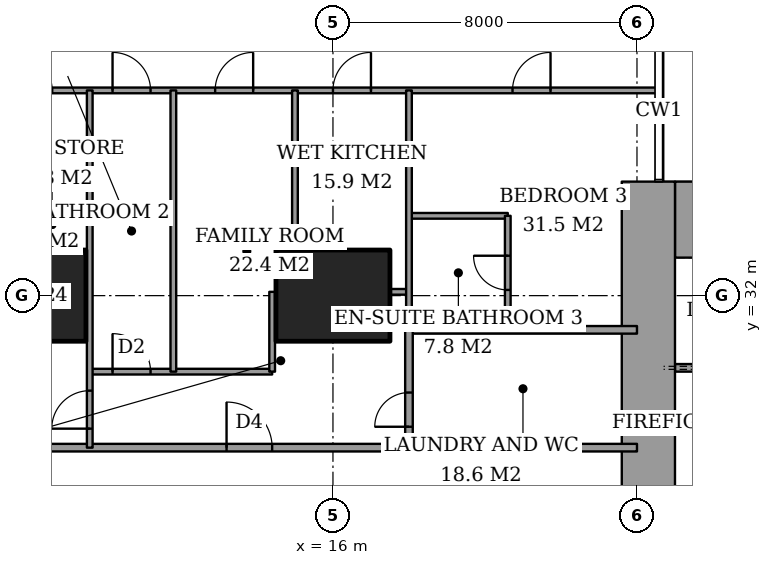
"""IFC4 building model, lengths in metres.
Left out: names, types, materials, properties, quantities, classifications, styles, units other than length and angle.
Written with IfcOpenShell. Run it as: python <this file> out.ifc"""

import sys

from ifc_helpers import new_model, si_unit, direction, frame, frame_2d, origin, origin_2d, place, context, subcontext, project, spatial, rectangle, extrude, element, fill, save


model = new_model("IFC4")
c1 = context("Model", 3, precision=1e-05, world=origin(), true_north=direction((0.0, 1.0)))
c2 = subcontext(c1, "Body", "Model", "MODEL_VIEW")
j1 = project(units=[si_unit("LENGTHUNIT", "METRE"), si_unit("PLANEANGLEUNIT", "RADIAN")], contexts=[c1])
p1 = place(None, origin())
s1 = spatial("IfcSite", under=j1, at=p1, CompositionType="ELEMENT")
p2 = place(p1, origin())
s2 = spatial("IfcBuilding", under=s1, at=p2, CompositionType="ELEMENT")
p3 = place(p2, frame((0.0, 0.0, 36.8)))
s3 = spatial("IfcBuildingStorey", under=s2, at=p3, CompositionType="ELEMENT", Elevation=36.8)
for number, where, z_axis, x_axis in (
    (1, (8.0, 32.0, 0.0), (0.0, 0.0, 1.0), (1.0, 0.0, 0.0)),
    (2, (16.0, 32.0, 0.0), (0.0, 0.0, 1.0), (1.0, 0.0, 0.0)),
):
    element("IfcColumn", number, at=place(p3, frame(where, z_axis=z_axis, x_axis=x_axis)), inside=s3, PredefinedType="COLUMN", context=c2, shape_type="SweptSolid", body=[
        extrude(rectangle(XDim=3.0, YDim=2.4, at=origin_2d()), origin(), (0.0, 0.0, 1.0), 3.6),
    ])
p4 = place(p3, frame((25.0, 34.0, 0.0), z_axis=(0.0, 0.0, 1.0), x_axis=(1.0, 0.0, 0.0)))
e3 = element("IfcWall", 3, at=p4, inside=s3, PredefinedType="SHEAR", context=c2, shape_type="SweptSolid", body=[
    extrude(rectangle(XDim=3.15, YDim=2.0, at=frame_2d((1.575, 0.0))), origin(), (0.0, 0.0, 1.0), 3.6),
])
p5 = place(p3, frame((24.3, 23.15, 0.0), z_axis=(0.0, 0.0, 1.0), x_axis=(0.0, 1.0, 0.0)))
e4 = element("IfcWall", 4, at=p5, inside=s3, PredefinedType="SHEAR", context=c2, shape_type="SweptSolid", body=[
    extrude(rectangle(XDim=11.85, YDim=1.4, at=frame_2d((5.925, 0.0))), origin(), (0.0, 0.0, 1.0), 3.6),
])
p6 = place(p5, frame((0.75, 0.0, 0.0)))
e5 = element("IfcOpeningElement", 5, at=p6, cuts=e4, PredefinedType="OPENING", context=c2, shape_type="SweptSolid", body=[
    extrude(rectangle(XDim=1.8, YDim=2.4, at=frame_2d((0.9, 1.2))), frame((0.0, 0.71, 0.0), z_axis=(0.0, -1.0, 0.0), x_axis=(1.0, 0.0, 0.0)), (0.0, 0.0, 1.0), 1.42),
])
p7 = place(p3, frame((6.725, 28.0, 0.0), z_axis=(0.0, 0.0, 1.0), x_axis=(1.0, 0.0, 0.0)))
e6 = element("IfcWall", 6, at=p7, inside=s3, PredefinedType="PARTITIONING", context=c2, shape_type="SweptSolid", body=[
    extrude(rectangle(XDim=17.275, YDim=0.2, at=frame_2d((8.637, 0.0))), origin(), (0.0, 0.0, 1.0), 3.35),
])
p8 = place(p7, frame((6.475, 0.0, 0.0)))
e7 = element("IfcOpeningElement", 7, at=p8, cuts=e6, PredefinedType="OPENING", context=c2, shape_type="SweptSolid", body=[
    extrude(rectangle(XDim=1.2, YDim=2.4, at=frame_2d((0.6, 1.2))), frame((0.0, 0.11, 0.0), z_axis=(0.0, -1.0, 0.0), x_axis=(1.0, 0.0, 0.0)), (0.0, 0.0, 1.0), 0.22),
])
p9 = place(p3, frame((9.6, 30.0, 0.0), z_axis=(0.0, 0.0, 1.0), x_axis=(1.0, 0.0, 0.0)))
e8 = element("IfcWall", 8, at=p9, inside=s3, PredefinedType="PARTITIONING", context=c2, shape_type="SweptSolid", body=[
    extrude(rectangle(XDim=4.8, YDim=0.15, at=frame_2d((2.4, 0.0))), origin(), (0.0, 0.0, 1.0), 3.35),
])
p10 = place(p9, frame((0.6, 0.0, 0.0)))
e9 = element("IfcOpeningElement", 9, at=p10, cuts=e8, PredefinedType="OPENING", context=c2, shape_type="SweptSolid", body=[
    extrude(rectangle(XDim=1.0, YDim=2.1, at=frame_2d((0.5, 1.05))), frame((0.0, 0.085, 0.0), z_axis=(0.0, -1.0, 0.0), x_axis=(1.0, 0.0, 0.0)), (0.0, 0.0, 1.0), 0.17),
])
p11 = place(p3, frame((18.0, 31.1, 0.0), z_axis=(0.0, 0.0, 1.0), x_axis=(1.0, 0.0, 0.0)))
e10 = element("IfcWall", 10, at=p11, inside=s3, PredefinedType="PARTITIONING", context=c2, shape_type="SweptSolid", body=[
    extrude(rectangle(XDim=6.0, YDim=0.2, at=frame_2d((3.0, 0.0))), origin(), (0.0, 0.0, 1.0), 3.35),
])
p12 = place(p3, frame((17.5, 32.1, 0.0), z_axis=(0.0, 0.0, 1.0), x_axis=(1.0, 0.0, 0.0)))
e11 = element("IfcWall", 11, at=p12, inside=s3, PredefinedType="PARTITIONING", context=c2, shape_type="SweptSolid", body=[
    extrude(rectangle(XDim=0.5, YDim=0.15, at=frame_2d((0.25, 0.0))), origin(), (0.0, 0.0, 1.0), 2.634),
])
p13 = place(p3, frame((18.0, 34.1, 0.0), z_axis=(0.0, 0.0, 1.0), x_axis=(1.0, 0.0, 0.0)))
e12 = element("IfcWall", 12, at=p13, inside=s3, PredefinedType="PARTITIONING", context=c2, shape_type="SweptSolid", body=[
    extrude(rectangle(XDim=2.6, YDim=0.15, at=frame_2d((1.3, 0.0))), origin(), (0.0, 0.0, 1.0), 3.35),
])
p14 = place(p3, frame((-0.45, 37.4, 0.0), z_axis=(0.0, 0.0, 1.0), x_axis=(1.0, 0.0, 0.0)))
e13 = element("IfcWall", 13, at=p14, inside=s3, PredefinedType="PARTITIONING", context=c2, shape_type="SweptSolid", body=[
    extrude(rectangle(XDim=25.011, YDim=0.15, at=frame_2d((12.505, 0.0))), origin(), (0.0, 0.0, 1.0), 3.35),
])
p15 = place(p14, frame((10.65, 0.0, 0.0)))
e14 = element("IfcOpeningElement", 14, at=p15, cuts=e13, PredefinedType="OPENING", context=c2, shape_type="SweptSolid", body=[
    extrude(rectangle(XDim=1.0, YDim=2.1, at=frame_2d((0.5, 1.05))), frame((0.0, 0.085, 0.0), z_axis=(0.0, -1.0, 0.0), x_axis=(1.0, 0.0, 0.0)), (0.0, 0.0, 1.0), 0.17),
])
p16 = place(p14, frame((3.087, 0.0, 0.0)))
e15 = element("IfcOpeningElement", 15, at=p16, cuts=e13, PredefinedType="OPENING", context=c2, shape_type="SweptSolid", body=[
    extrude(rectangle(XDim=1.0, YDim=2.1, at=frame_2d((0.5, 1.05))), frame((0.0, 0.085, 0.0), z_axis=(0.0, -1.0, 0.0), x_axis=(1.0, 0.0, 0.0)), (0.0, 0.0, 1.0), 0.17),
])
p17 = place(p14, frame((8.163, 0.0, 0.0)))
e16 = element("IfcOpeningElement", 16, at=p17, cuts=e13, PredefinedType="OPENING", context=c2, shape_type="SweptSolid", body=[
    extrude(rectangle(XDim=0.9, YDim=2.1, at=frame_2d((0.45, 1.05))), frame((0.0, 0.085, 0.0), z_axis=(0.0, -1.0, 0.0), x_axis=(1.0, 0.0, 0.0)), (0.0, 0.0, 1.0), 0.17),
])
p18 = place(p14, frame((13.35, 0.0, 0.0)))
e17 = element("IfcOpeningElement", 17, at=p18, cuts=e13, PredefinedType="OPENING", context=c2, shape_type="SweptSolid", body=[
    extrude(rectangle(XDim=1.0, YDim=2.1, at=frame_2d((0.5, 1.05))), frame((0.0, 0.085, 0.0), z_axis=(0.0, -1.0, 0.0), x_axis=(1.0, 0.0, 0.0)), (0.0, 0.0, 1.0), 0.17),
])
p19 = place(p14, frame((16.45, 0.0, 0.0)))
e18 = element("IfcOpeningElement", 18, at=p19, cuts=e13, PredefinedType="OPENING", context=c2, shape_type="SweptSolid", body=[
    extrude(rectangle(XDim=1.0, YDim=2.1, at=frame_2d((0.5, 1.05))), frame((0.0, 0.085, 0.0), z_axis=(0.0, -1.0, 0.0), x_axis=(1.0, 0.0, 0.0)), (0.0, 0.0, 1.0), 0.17),
])
p20 = place(p14, frame((21.175, 0.0, 0.0)))
e19 = element("IfcOpeningElement", 19, at=p20, cuts=e13, PredefinedType="OPENING", context=c2, shape_type="SweptSolid", body=[
    extrude(rectangle(XDim=1.0, YDim=2.1, at=frame_2d((0.5, 1.05))), frame((0.0, 0.085, 0.0), z_axis=(0.0, -1.0, 0.0), x_axis=(1.0, 0.0, 0.0)), (0.0, 0.0, 1.0), 0.17),
])
p21 = place(p3, frame((9.6, 28.0, 0.0), z_axis=(0.0, 0.0, 1.0), x_axis=(0.0, 1.0, 0.0)))
e20 = element("IfcWall", 20, at=p21, inside=s3, PredefinedType="PARTITIONING", context=c2, shape_type="SweptSolid", body=[
    extrude(rectangle(XDim=9.4, YDim=0.15, at=frame_2d((4.7, 0.0))), origin(), (0.0, 0.0, 1.0), 3.35),
])
p22 = place(p21, frame((0.5, 0.0, 0.0)))
e21 = element("IfcOpeningElement", 21, at=p22, cuts=e20, PredefinedType="OPENING", context=c2, shape_type="SweptSolid", body=[
    extrude(rectangle(XDim=1.0, YDim=2.1, at=frame_2d((0.5, 1.05))), frame((0.0, 0.085, 0.0), z_axis=(0.0, -1.0, 0.0), x_axis=(1.0, 0.0, 0.0)), (0.0, 0.0, 1.0), 0.17),
])
p23 = place(p3, frame((11.8, 30.0, 0.0), z_axis=(0.0, 0.0, 1.0), x_axis=(0.0, 1.0, 0.0)))
e22 = element("IfcWall", 22, at=p23, inside=s3, PredefinedType="PARTITIONING", context=c2, shape_type="SweptSolid", body=[
    extrude(rectangle(XDim=7.4, YDim=0.15, at=frame_2d((3.7, 0.0))), origin(), (0.0, 0.0, 1.0), 3.35),
])
p24 = place(p3, frame((14.4, 30.0, 0.0), z_axis=(0.0, 0.0, 1.0), x_axis=(0.0, 1.0, 0.0)))
e23 = element("IfcWall", 23, at=p24, inside=s3, PredefinedType="PARTITIONING", context=c2, shape_type="SweptSolid", body=[
    extrude(rectangle(XDim=2.1, YDim=0.15, at=frame_2d((1.05, 0.0))), origin(), (0.0, 0.0, 1.0), 3.35),
])
p25 = place(p3, frame((15.0, 33.2, 0.0), z_axis=(0.0, 0.0, 1.0), x_axis=(0.0, 1.0, 0.0)))
e24 = element("IfcWall", 24, at=p25, inside=s3, PredefinedType="PARTITIONING", context=c2, shape_type="SweptSolid", body=[
    extrude(rectangle(XDim=4.2, YDim=0.15, at=frame_2d((2.1, 0.0))), origin(), (0.0, 0.0, 1.0), 3.35),
])
p26 = place(p3, frame((18.0, 28.0, 0.0), z_axis=(0.0, 0.0, 1.0), x_axis=(0.0, 1.0, 0.0)))
e25 = element("IfcWall", 25, at=p26, inside=s3, PredefinedType="PARTITIONING", context=c2, shape_type="SweptSolid", body=[
    extrude(rectangle(XDim=3.1, YDim=0.2, at=frame_2d((1.55, 0.0))), origin(), (0.0, 0.0, 1.0), 3.35),
])
p27 = place(p26, frame((0.55, 0.0, 0.0)))
e26 = element("IfcOpeningElement", 26, at=p27, cuts=e25, PredefinedType="OPENING", context=c2, shape_type="SweptSolid", body=[
    extrude(rectangle(XDim=0.9, YDim=2.1, at=frame_2d((0.45, 1.05))), frame((0.0, 0.11, 0.0), z_axis=(0.0, -1.0, 0.0), x_axis=(1.0, 0.0, 0.0)), (0.0, 0.0, 1.0), 0.22),
])
p28 = place(p3, frame((18.0, 31.1, 0.0), z_axis=(0.0, 0.0, 1.0), x_axis=(0.0, 1.0, 0.0)))
e27 = element("IfcWall", 27, at=p28, inside=s3, PredefinedType="PARTITIONING", context=c2, shape_type="SweptSolid", body=[
    extrude(rectangle(XDim=6.3, YDim=0.15, at=frame_2d((3.15, 0.0))), origin(), (0.0, 0.0, 1.0), 3.35),
])
p29 = place(p3, frame((20.6, 31.1, 0.0), z_axis=(0.0, 0.0, 1.0), x_axis=(0.0, 1.0, 0.0)))
e28 = element("IfcWall", 28, at=p29, inside=s3, PredefinedType="PARTITIONING", context=c2, shape_type="SweptSolid", body=[
    extrude(rectangle(XDim=3.0, YDim=0.15, at=frame_2d((1.5, 0.0))), origin(), (0.0, 0.0, 1.0), 3.35),
])
p30 = place(p29, frame((1.05, 0.0, 0.0)))
e29 = element("IfcOpeningElement", 29, at=p30, cuts=e28, PredefinedType="OPENING", context=c2, shape_type="SweptSolid", body=[
    extrude(rectangle(XDim=0.9, YDim=2.1, at=frame_2d((0.45, 1.05))), frame((0.0, 0.085, 0.0), z_axis=(0.0, -1.0, 0.0), x_axis=(1.0, 0.0, 0.0)), (0.0, 0.0, 1.0), 0.17),
])
p31 = place(p3, frame((25.0, 30.1, 0.0), z_axis=(0.0, 0.0, 1.0), x_axis=(1.0, 0.0, 0.0)))
e30 = element("IfcWall", 30, at=p31, inside=s3, PredefinedType="PARTITIONING", context=c2, shape_type="SweptSolid", body=[
    extrude(rectangle(XDim=12.7, YDim=0.2, at=frame_2d((6.35, 0.0))), origin(), (0.0, 0.0, 1.0), 3.6),
])
p32 = place(p31, frame((0.9, 0.0, 0.0)))
e31 = element("IfcOpeningElement", 31, at=p32, cuts=e30, PredefinedType="OPENING", context=c2, shape_type="SweptSolid", body=[
    extrude(rectangle(XDim=1.2, YDim=2.1, at=frame_2d((0.6, 1.05))), frame((0.0, 0.11, 0.0), z_axis=(0.0, -1.0, 0.0), x_axis=(1.0, 0.0, 0.0)), (0.0, 0.0, 1.0), 0.22),
])
p33 = place(p15, origin())
e32 = element("IfcDoor", 32, at=p33, inside=s3, OperationType="SINGLE_SWING_RIGHT", PredefinedType="DOOR", context=c2, shape_type="SweptSolid", body=[
    extrude(rectangle(XDim=1.0, YDim=2.1, at=frame_2d((0.5, 1.05))), frame((0.0, 0.025, 0.0), z_axis=(0.0, -1.0, 0.0), x_axis=(1.0, 0.0, 0.0)), (0.0, 0.0, 1.0), 0.05),
])
fill(e14, e32)
p34 = place(p17, origin())
e33 = element("IfcDoor", 33, at=p34, inside=s3, OperationType="SINGLE_SWING_RIGHT", PredefinedType="DOOR", context=c2, shape_type="SweptSolid", body=[
    extrude(rectangle(XDim=0.9, YDim=2.1, at=frame_2d((0.45, 1.05))), frame((0.0, 0.025, 0.0), z_axis=(0.0, -1.0, 0.0), x_axis=(1.0, 0.0, 0.0)), (0.0, 0.0, 1.0), 0.05),
])
fill(e16, e33)
p35 = place(p22, origin())
e34 = element("IfcDoor", 34, at=p35, inside=s3, OperationType="SINGLE_SWING_RIGHT", PredefinedType="DOOR", context=c2, shape_type="SweptSolid", body=[
    extrude(rectangle(XDim=1.0, YDim=2.1, at=frame_2d((0.5, 1.05))), frame((0.0, 0.025, 0.0), z_axis=(0.0, -1.0, 0.0), x_axis=(1.0, 0.0, 0.0)), (0.0, 0.0, 1.0), 0.05),
])
fill(e21, e34)
p36 = place(p8, origin())
e35 = element("IfcDoor", 35, at=p36, inside=s3, OperationType="SINGLE_SWING_RIGHT", PredefinedType="DOOR", context=c2, shape_type="SweptSolid", body=[
    extrude(rectangle(XDim=1.2, YDim=2.4, at=frame_2d((0.6, 1.2))), frame((0.0, 0.025, 0.0), z_axis=(0.0, -1.0, 0.0), x_axis=(1.0, 0.0, 0.0)), (0.0, 0.0, 1.0), 0.05),
])
fill(e7, e35)
p37 = place(p10, origin())
e36 = element("IfcDoor", 36, at=p37, inside=s3, OperationType="SINGLE_SWING_RIGHT", PredefinedType="DOOR", context=c2, shape_type="SweptSolid", body=[
    extrude(rectangle(XDim=1.0, YDim=2.1, at=frame_2d((0.5, 1.05))), frame((0.0, 0.025, 0.0), z_axis=(0.0, -1.0, 0.0), x_axis=(1.0, 0.0, 0.0)), (0.0, 0.0, 1.0), 0.05),
])
fill(e9, e36)
p38 = place(p18, origin())
e37 = element("IfcDoor", 37, at=p38, inside=s3, OperationType="SINGLE_SWING_LEFT", PredefinedType="DOOR", context=c2, shape_type="SweptSolid", body=[
    extrude(rectangle(XDim=1.0, YDim=2.1, at=frame_2d((0.5, 1.05))), frame((0.0, 0.025, 0.0), z_axis=(0.0, -1.0, 0.0), x_axis=(1.0, 0.0, 0.0)), (0.0, 0.0, 1.0), 0.05),
])
fill(e17, e37)
p39 = place(p19, origin())
e38 = element("IfcDoor", 38, at=p39, inside=s3, OperationType="SINGLE_SWING_LEFT", PredefinedType="DOOR", context=c2, shape_type="SweptSolid", body=[
    extrude(rectangle(XDim=1.0, YDim=2.1, at=frame_2d((0.5, 1.05))), frame((0.0, 0.025, 0.0), z_axis=(0.0, -1.0, 0.0), x_axis=(1.0, 0.0, 0.0)), (0.0, 0.0, 1.0), 0.05),
])
fill(e18, e38)
p40 = place(p30, origin())
e39 = element("IfcDoor", 39, at=p40, inside=s3, OperationType="SINGLE_SWING_LEFT", PredefinedType="DOOR", context=c2, shape_type="SweptSolid", body=[
    extrude(rectangle(XDim=0.9, YDim=2.1, at=frame_2d((0.45, 1.05))), frame((0.0, 0.025, 0.0), z_axis=(0.0, -1.0, 0.0), x_axis=(1.0, 0.0, 0.0)), (0.0, 0.0, 1.0), 0.05),
])
fill(e29, e39)
p41 = place(p20, origin())
e40 = element("IfcDoor", 40, at=p41, inside=s3, OperationType="SINGLE_SWING_LEFT", PredefinedType="DOOR", context=c2, shape_type="SweptSolid", body=[
    extrude(rectangle(XDim=1.0, YDim=2.1, at=frame_2d((0.5, 1.05))), frame((0.0, 0.025, 0.0), z_axis=(0.0, -1.0, 0.0), x_axis=(1.0, 0.0, 0.0)), (0.0, 0.0, 1.0), 0.05),
])
fill(e19, e40)
p42 = place(p27, origin())
e41 = element("IfcDoor", 41, at=p42, inside=s3, OperationType="SINGLE_SWING_RIGHT", PredefinedType="DOOR", context=c2, shape_type="SweptSolid", body=[
    extrude(rectangle(XDim=0.9, YDim=2.1, at=frame_2d((0.45, 1.05))), frame((0.0, 0.025, 0.0), z_axis=(0.0, -1.0, 0.0), x_axis=(1.0, 0.0, 0.0)), (0.0, 0.0, 1.0), 0.05),
])
fill(e26, e41)
save(model, sys.argv[1])
